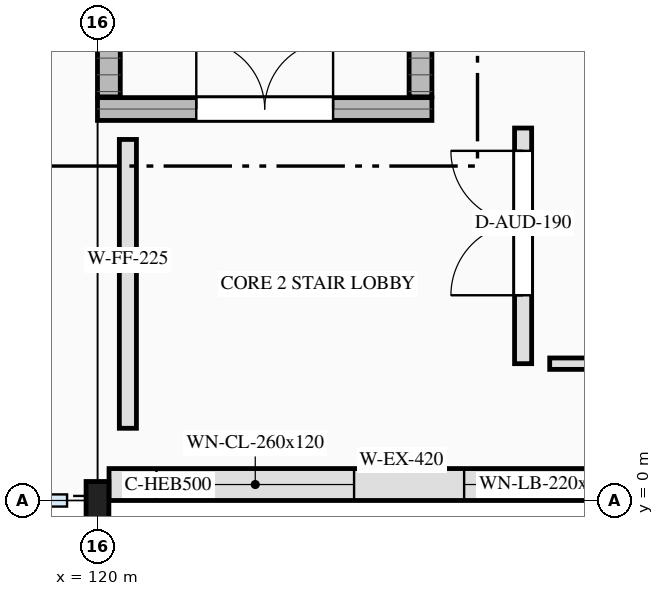
"""IFC4 building model, lengths in metres.
Left out: names, types, materials, properties, quantities, classifications, styles, units other than length and angle.
Written with IfcOpenShell. Run it as: python <this file> out.ifc"""

import sys

from ifc_helpers import new_model, si_unit, direction, frame, frame_2d, origin, origin_2d, place, context, subcontext, project, spatial, rectangle, i_section, extrude, element, fill, save


model = new_model("IFC4")
c1 = context("Model", 3, precision=1e-05, world=origin(), true_north=direction((0.0, 1.0)))
c2 = subcontext(c1, "Body", "Model", "MODEL_VIEW")
j1 = project(units=[si_unit("LENGTHUNIT", "METRE"), si_unit("PLANEANGLEUNIT", "RADIAN")], contexts=[c1])
p1 = place(None, origin())
s1 = spatial("IfcSite", under=j1, at=p1, CompositionType="ELEMENT")
p2 = place(p1, origin())
s2 = spatial("IfcBuilding", under=s1, at=p2, CompositionType="ELEMENT")
p3 = place(p2, frame((0.0, 0.0, 5.4)))
s3 = spatial("IfcBuildingStorey", under=s2, at=p3, CompositionType="ELEMENT", Elevation=5.4)
p4 = place(p3, frame((120.0, 5.15, 0.0), z_axis=(0.0, 0.0, 1.0), x_axis=(1.0, 0.0, 0.0)))
e1 = element("IfcWall", 1, at=p4, inside=s3, PredefinedType="SHEAR", context=c2, shape_type="SweptSolid", body=[
    extrude(rectangle(XDim=4.4, YDim=0.3, at=frame_2d((2.2, 0.0))), origin(), (0.0, 0.0, 1.0), 4.2),
])
p5 = place(p4, frame((1.3, 0.0, 0.0)))
e2 = element("IfcOpeningElement", 2, at=p5, cuts=e1, PredefinedType="OPENING", context=c2, shape_type="SweptSolid", body=[
    extrude(rectangle(XDim=1.8, YDim=2.2, at=frame_2d((0.9, 1.1))), frame((0.0, 0.16, 0.0), z_axis=(0.0, -1.0, 0.0), x_axis=(1.0, 0.0, 0.0)), (0.0, 0.0, 1.0), 0.32),
])
for number, where, z_axis, x_axis in (
    (3, (120.15, 5.31, 0.0), (0.0, 0.0, 1.0), (0.0, 1.0, 0.0)),
    (4, (124.25, 5.31, 0.0), (0.0, 0.0, 1.0), (0.0, 1.0, 0.0)),
):
    element("IfcWall", number, at=place(p3, frame(where, z_axis=z_axis, x_axis=x_axis)), inside=s3, PredefinedType="SHEAR", context=c2, shape_type="SweptSolid", body=[
        extrude(rectangle(XDim=9.38, YDim=0.3, at=frame_2d((4.69, 0.0))), origin(), (0.0, 0.0, 1.0), 4.2),
    ])
p6 = place(p3, frame((120.0, 0.0, 0.0), z_axis=(0.0, 0.0, 1.0), x_axis=(1.0, 0.0, 0.0)))
e5 = element("IfcColumn", 5, at=p6, inside=s3, PredefinedType="COLUMN", context=c2, shape_type="SweptSolid", body=[
    extrude(i_section(OverallWidth=0.3, OverallDepth=0.5, WebThickness=0.014, FlangeThickness=0.028, FilletRadius=0.027, at=origin_2d()), origin(), (0.0, 0.0, 1.0), 4.2),
])
p7 = place(p3, frame((127.848, 0.21, 0.0), z_axis=(0.0, 0.0, 1.0), x_axis=(-1.0, 0.0, 0.0)))
e6 = element("IfcWall", 6, at=p7, inside=s3, PredefinedType="SOLIDWALL", context=c2, shape_type="SweptSolid", body=[
    extrude(rectangle(XDim=7.696, YDim=0.42, at=frame_2d((3.848, 0.0))), origin(), (0.0, 0.0, 1.0), 3.415),
])
p8 = place(p7, frame((0.824, 0.0, 0.85)))
e7 = element("IfcOpeningElement", 7, at=p8, cuts=e6, PredefinedType="OPENING", context=c2, shape_type="SweptSolid", body=[
    extrude(rectangle(XDim=2.2, YDim=1.9, at=frame_2d((1.1, 0.95))), frame((0.0, 0.22, 0.0), z_axis=(0.0, -1.0, 0.0), x_axis=(1.0, 0.0, 0.0)), (0.0, 0.0, 1.0), 0.44),
])
p9 = place(p7, frame((4.472, 0.0, 2.0)))
e8 = element("IfcOpeningElement", 8, at=p9, cuts=e6, PredefinedType="OPENING", context=c2, shape_type="SweptSolid", body=[
    extrude(rectangle(XDim=2.6, YDim=1.2, at=frame_2d((1.3, 0.6))), frame((0.0, 0.22, 0.0), z_axis=(0.0, -1.0, 0.0), x_axis=(1.0, 0.0, 0.0)), (0.0, 0.0, 1.0), 0.44),
])
p10 = place(p3, frame((125.6, 1.8, 0.0), z_axis=(0.0, 0.0, 1.0), x_axis=(0.0, 1.0, 0.0)))
e9 = element("IfcWall", 9, at=p10, inside=s3, PredefinedType="SOLIDWALL", context=c2, shape_type="SweptSolid", body=[
    extrude(rectangle(XDim=3.1, YDim=0.225, at=frame_2d((1.55, 0.0))), origin(), (0.0, 0.0, 1.0), 3.92),
])
p11 = place(p10, frame((0.9, 0.0, 0.0)))
e10 = element("IfcOpeningElement", 10, at=p11, cuts=e9, PredefinedType="OPENING", context=c2, shape_type="SweptSolid", body=[
    extrude(rectangle(XDim=1.9, YDim=2.35, at=frame_2d((0.95, 1.175))), frame((0.0, 0.123, 0.0), z_axis=(0.0, -1.0, 0.0), x_axis=(1.0, 0.0, 0.0)), (0.0, 0.0, 1.0), 0.245),
])
p12 = place(p3, frame((120.4, 0.95, 0.0), z_axis=(0.0, 0.0, 1.0), x_axis=(0.0, 1.0, 0.0)))
e11 = element("IfcWall", 11, at=p12, inside=s3, PredefinedType="SOLIDWALL", context=c2, shape_type="SweptSolid", body=[
    extrude(rectangle(XDim=3.8, YDim=0.225, at=frame_2d((1.9, 0.0))), origin(), (0.0, 0.0, 1.0), 3.92),
])
p13 = place(p3, frame((125.95, 1.8, 0.0), z_axis=(0.0, 0.0, 1.0), x_axis=(1.0, 0.0, 0.0)))
e12 = element("IfcWall", 12, at=p13, inside=s3, PredefinedType="PARTITIONING", context=c2, shape_type="SweptSolid", body=[
    extrude(rectangle(XDim=41.1, YDim=0.15, at=frame_2d((20.55, 0.0))), origin(), (0.0, 0.0, 1.0), 3.92),
])
p14 = place(p8, origin())
e13 = element("IfcWindow", 13, at=p14, inside=s3, PartitioningType="TRIPLE_PANEL_VERTICAL", PredefinedType="WINDOW", context=c2, shape_type="SweptSolid", body=[
    extrude(rectangle(XDim=2.2, YDim=1.9, at=frame_2d((1.1, 0.95))), frame((0.0, 0.03, 0.0), z_axis=(0.0, -1.0, 0.0), x_axis=(1.0, 0.0, 0.0)), (0.0, 0.0, 1.0), 0.06),
])
fill(e7, e13)
p15 = place(p9, origin())
e14 = element("IfcWindow", 14, at=p15, inside=s3, PartitioningType="DOUBLE_PANEL_HORIZONTAL", PredefinedType="WINDOW", context=c2, shape_type="SweptSolid", body=[
    extrude(rectangle(XDim=2.6, YDim=1.2, at=frame_2d((1.3, 0.6))), frame((0.0, 0.03, 0.0), z_axis=(0.0, -1.0, 0.0), x_axis=(1.0, 0.0, 0.0)), (0.0, 0.0, 1.0), 0.06),
])
fill(e8, e14)
p16 = place(p5, origin())
e15 = element("IfcDoor", 15, at=p16, inside=s3, OperationType="DOUBLE_DOOR_SINGLE_SWING", PredefinedType="DOOR", context=c2, shape_type="SweptSolid", body=[
    extrude(rectangle(XDim=1.8, YDim=2.2, at=frame_2d((0.9, 1.1))), frame((0.0, 0.025, 0.0), z_axis=(0.0, -1.0, 0.0), x_axis=(1.0, 0.0, 0.0)), (0.0, 0.0, 1.0), 0.05),
])
fill(e2, e15)
p17 = place(p11, origin())
e16 = element("IfcDoor", 16, at=p17, inside=s3, OperationType="DOUBLE_DOOR_SINGLE_SWING", PredefinedType="DOOR", context=c2, shape_type="SweptSolid", body=[
    extrude(rectangle(XDim=1.9, YDim=2.35, at=frame_2d((0.95, 1.175))), frame((0.0, 0.025, 0.0), z_axis=(0.0, -1.0, 0.0), x_axis=(1.0, 0.0, 0.0)), (0.0, 0.0, 1.0), 0.05),
])
fill(e10, e16)
save(model, sys.argv[1])
